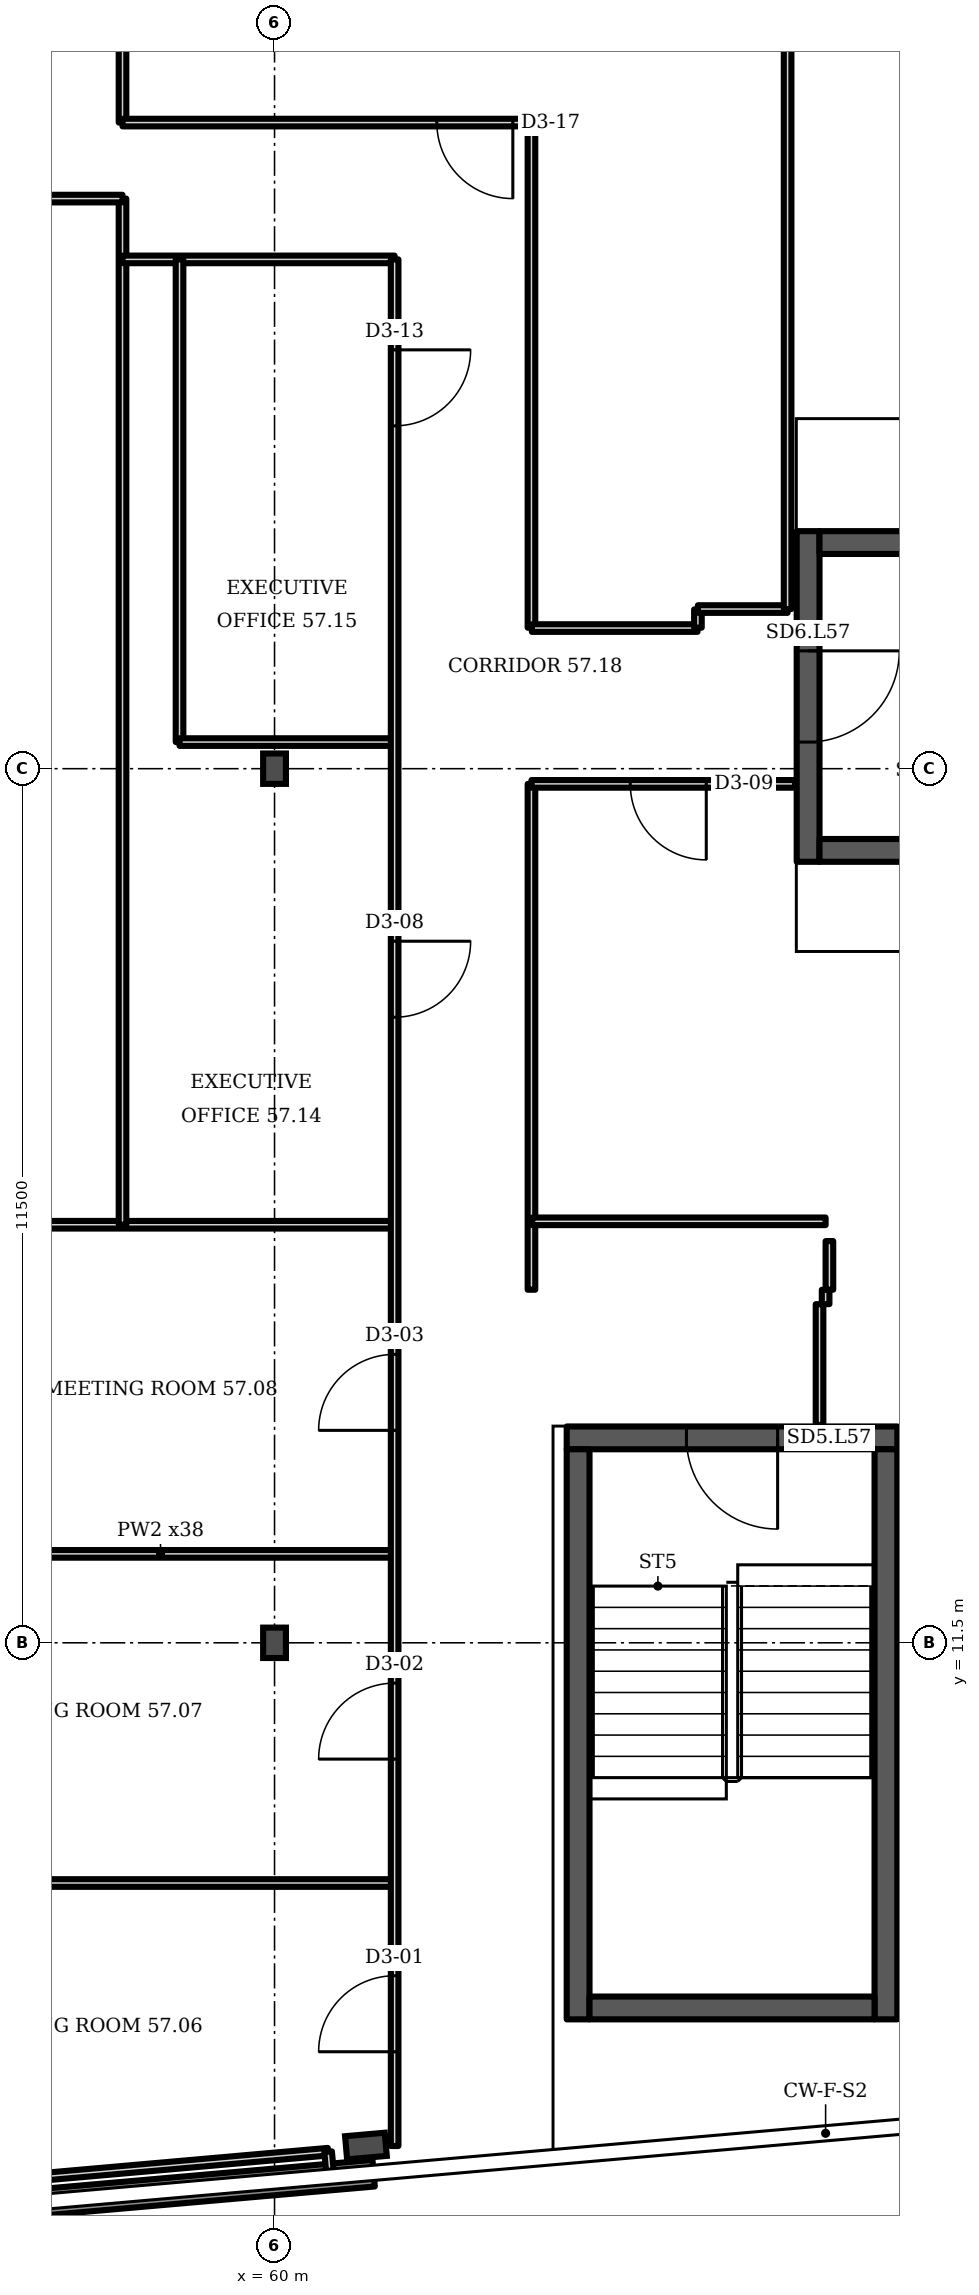
"""IFC4 building model, lengths in metres.
Left out: names, types, materials, properties, quantities, classifications, styles, units other than length and angle.
Written with IfcOpenShell. Run it as: python <this file> out.ifc"""

import sys

from ifc_helpers import new_model, si_unit, direction, frame, frame_2d, origin, origin_2d, place, context, subcontext, project, spatial, rectangle, i_section, extrude, element, fill, save


model = new_model("IFC4")
c1 = context("Model", 3, precision=1e-05, world=origin(), true_north=direction((0.0, 1.0)))
c2 = subcontext(c1, "Body", "Model", "MODEL_VIEW")
j1 = project(units=[si_unit("LENGTHUNIT", "METRE"), si_unit("PLANEANGLEUNIT", "RADIAN")], contexts=[c1])
p1 = place(None, origin())
s1 = spatial("IfcSite", under=j1, at=p1, CompositionType="ELEMENT")
p2 = place(p1, origin())
s2 = spatial("IfcBuilding", under=s1, at=p2, CompositionType="ELEMENT")
p3 = place(p2, frame((0.0, 0.0, 228.7)))
s3 = spatial("IfcBuildingStorey", under=s2, at=p3, CompositionType="ELEMENT", Elevation=228.7)
p4 = place(p3, frame((61.202, 4.879, 0.0), z_axis=(0.0, 0.0, 1.0), x_axis=(0.087156, -0.996197, 0.0)))
e1 = element("IfcColumn", 1, at=p4, inside=s3, PredefinedType="COLUMN", context=c2, shape_type="SweptSolid", body=[
    extrude(i_section(OverallWidth=0.306, OverallDepth=0.524, WebThickness=0.021, FlangeThickness=0.04, FilletRadius=0.027, at=origin_2d()), origin(), (0.0, 0.0, 1.0), 3.6),
])
for number, where, z_axis, x_axis in (
    (2, (60.0, 11.5, 0.0), (0.0, 0.0, 1.0), (1.0, 0.0, 0.0)),
    (3, (60.0, 23.0, 0.0), (0.0, 0.0, 1.0), (1.0, 0.0, 0.0)),
):
    element("IfcColumn", number, at=place(p3, frame(where, z_axis=z_axis, x_axis=x_axis)), inside=s3, PredefinedType="COLUMN", context=c2, shape_type="SweptSolid", body=[
        extrude(i_section(OverallWidth=0.3, OverallDepth=0.4, WebThickness=0.013, FlangeThickness=0.024, FilletRadius=0.027, at=origin_2d()), origin(), (0.0, 0.0, 1.0), 3.6),
    ])
p5 = place(p3, frame((49.545, 3.493, 0.0), z_axis=(0.0, 0.0, 1.0), x_axis=(0.996196, 0.087141, 0.0)))
e4 = element("IfcWall", 4, at=p5, inside=s3, PredefinedType="SOLIDWALL", context=c2, shape_type="SweptSolid", body=[
    extrude(rectangle(XDim=11.803, YDim=0.35, at=frame_2d((5.902, 0.0))), origin(), (0.0, 0.0, 1.0), 1.0),
])
p6 = place(p3, frame((63.844, 14.196, 0.0), z_axis=(0.0, 0.0, 1.0), x_axis=(1.0, 0.0, 0.0)))
e5 = element("IfcWall", 5, at=p6, inside=s3, PredefinedType="SHEAR", context=c2, shape_type="SweptSolid", body=[
    extrude(rectangle(XDim=4.35, YDim=0.3, at=frame_2d((2.175, 0.0))), origin(), (0.0, 0.0, 1.0), 3.2),
])
p7 = place(p6, frame((1.575, 0.0, 0.0)))
e6 = element("IfcOpeningElement", 6, at=p7, cuts=e5, PredefinedType="OPENING", context=c2, shape_type="SweptSolid", body=[
    extrude(rectangle(XDim=1.2, YDim=2.1, at=frame_2d((0.6, 1.05))), frame((0.0, 0.16, 0.0), z_axis=(0.0, -1.0, 0.0), x_axis=(1.0, 0.0, 0.0)), (0.0, 0.0, 1.0), 0.32),
])
p8 = place(p3, frame((67.02, 21.775, 0.0), z_axis=(0.0, 0.0, 1.0), x_axis=(0.0, 1.0, 0.0)))
e7 = element("IfcWall", 7, at=p8, inside=s3, PredefinedType="SHEAR", context=c2, shape_type="SweptSolid", body=[
    extrude(rectangle(XDim=4.35, YDim=0.3, at=frame_2d((2.175, 0.0))), origin(), (0.0, 0.0, 1.0), 3.2),
])
p9 = place(p8, frame((1.575, 0.0, 0.0)))
e8 = element("IfcOpeningElement", 8, at=p9, cuts=e7, PredefinedType="OPENING", context=c2, shape_type="SweptSolid", body=[
    extrude(rectangle(XDim=1.2, YDim=2.1, at=frame_2d((0.6, 1.05))), frame((0.0, 0.16, 0.0), z_axis=(0.0, -1.0, 0.0), x_axis=(1.0, 0.0, 0.0)), (0.0, 0.0, 1.0), 0.32),
])
p10 = place(p3, frame((39.04, 17.0, 0.0), z_axis=(0.0, 0.0, 1.0), x_axis=(1.0, 0.0, 0.0)))
e9 = element("IfcWall", 9, at=p10, inside=s3, PredefinedType="PARTITIONING", context=c2, shape_type="SweptSolid", body=[
    extrude(rectangle(XDim=22.54, YDim=0.1, at=frame_2d((11.27, 0.0))), origin(), (0.0, 0.0, 1.0), 3.2),
])
p11 = place(p3, frame((55.415, 4.34, 0.0), z_axis=(0.0, 0.0, 1.0), x_axis=(0.996159, 0.087534, 0.0)))
e10 = element("IfcWall", 10, at=p11, inside=s3, PredefinedType="PARTITIONING", context=c2, shape_type="SweptSolid", body=[
    extrude(rectangle(XDim=5.31, YDim=0.1, at=frame_2d((2.655, 0.0))), origin(), (0.0, 0.0, 1.0), 2.58),
])
for number, where, z_axis, x_axis in (
    (11, (55.42, 8.34, 0.0), (0.0, 0.0, 1.0), (1.0, 0.0, 0.0)),
    (12, (55.42, 12.67, 0.0), (0.0, 0.0, 1.0), (1.0, 0.0, 0.0)),
):
    element("IfcWall", number, at=place(p3, frame(where, z_axis=z_axis, x_axis=x_axis)), inside=s3, PredefinedType="PARTITIONING", context=c2, shape_type="SweptSolid", body=[
        extrude(rectangle(XDim=6.16, YDim=0.1, at=frame_2d((3.08, 0.0))), origin(), (0.0, 0.0, 1.0), 3.2),
    ])
p12 = place(p3, frame((58.0, 17.0, 0.0), z_axis=(0.0, 0.0, 1.0), x_axis=(0.0, 1.0, 0.0)))
e13 = element("IfcWall", 13, at=p12, inside=s3, PredefinedType="PARTITIONING", context=c2, shape_type="SweptSolid", body=[
    extrude(rectangle(XDim=13.5, YDim=0.1, at=frame_2d((6.75, 0.0))), origin(), (0.0, 0.0, 1.0), 3.2),
])
p13 = place(p3, frame((58.0, 29.7, 0.0), z_axis=(0.0, 0.0, 1.0), x_axis=(1.0, 0.0, 0.0)))
e14 = element("IfcWall", 14, at=p13, inside=s3, PredefinedType="PARTITIONING", context=c2, shape_type="SweptSolid", body=[
    extrude(rectangle(XDim=3.58, YDim=0.1, at=frame_2d((1.79, 0.0))), origin(), (0.0, 0.0, 1.0), 3.2),
])
p14 = place(p3, frame((58.0, 31.5, 0.0), z_axis=(0.0, 0.0, 1.0), x_axis=(0.0, 1.0, 0.0)))
e15 = element("IfcWall", 15, at=p14, inside=s3, PredefinedType="PARTITIONING", context=c2, shape_type="SweptSolid", body=[
    extrude(rectangle(XDim=2.48, YDim=0.1, at=frame_2d((1.24, 0.0))), origin(), (0.0, 0.0, 1.0), 3.2),
])
p15 = place(p3, frame((58.0, 31.5, 0.0), z_axis=(0.0, 0.0, 1.0), x_axis=(1.0, 0.0, 0.0)))
e16 = element("IfcWall", 16, at=p15, inside=s3, PredefinedType="PARTITIONING", context=c2, shape_type="SweptSolid", body=[
    extrude(rectangle(XDim=5.38, YDim=0.1, at=frame_2d((2.69, 0.0))), origin(), (0.0, 0.0, 1.0), 3.2),
])
p16 = place(p15, frame((4.135, 0.0, 0.0)))
e17 = element("IfcOpeningElement", 17, at=p16, cuts=e16, PredefinedType="OPENING", context=c2, shape_type="SweptSolid", body=[
    extrude(rectangle(XDim=1.0, YDim=2.1, at=frame_2d((0.5, 1.05))), frame((0.0, 0.06, 0.0), z_axis=(0.0, -1.0, 0.0), x_axis=(1.0, 0.0, 0.0)), (0.0, 0.0, 1.0), 0.12),
])
p17 = place(p3, frame((58.75, 23.35, 0.0), z_axis=(0.0, 0.0, 1.0), x_axis=(0.0, 1.0, 0.0)))
e18 = element("IfcWall", 18, at=p17, inside=s3, PredefinedType="PARTITIONING", context=c2, shape_type="SweptSolid", body=[
    extrude(rectangle(XDim=6.35, YDim=0.1, at=frame_2d((3.175, 0.0))), origin(), (0.0, 0.0, 1.0), 3.2),
])
p18 = place(p3, frame((58.75, 23.35, 0.0), z_axis=(0.0, 0.0, 1.0), x_axis=(1.0, 0.0, 0.0)))
e19 = element("IfcWall", 19, at=p18, inside=s3, PredefinedType="PARTITIONING", context=c2, shape_type="SweptSolid", body=[
    extrude(rectangle(XDim=2.83, YDim=0.1, at=frame_2d((1.415, 0.0))), origin(), (0.0, 0.0, 1.0), 3.2),
])
p19 = place(p3, frame((60.733, 4.497, 0.0), z_axis=(0.0, 0.0, 1.0), x_axis=(-0.090037, 0.995936, 0.0)))
e20 = element("IfcWall", 20, at=p19, inside=s3, PredefinedType="PARTITIONING", context=c2, shape_type="SweptSolid", body=[
    extrude(rectangle(XDim=0.309, YDim=0.1, at=frame_2d((0.155, 0.0))), origin(), (0.0, 0.0, 1.0), 3.2),
])
p20 = place(p3, frame((61.58, 4.88, 0.0), z_axis=(0.0, 0.0, 1.0), x_axis=(0.0, 1.0, 0.0)))
e21 = element("IfcWall", 21, at=p20, inside=s3, PredefinedType="PARTITIONING", context=c2, shape_type="SweptSolid", body=[
    extrude(rectangle(XDim=24.82, YDim=0.1, at=frame_2d((12.41, 0.0))), origin(), (0.0, 0.0, 1.0), 3.2),
])
p21 = place(p20, frame((1.24, 0.0, 0.0)))
e22 = element("IfcOpeningElement", 22, at=p21, cuts=e21, PredefinedType="OPENING", context=c2, shape_type="SweptSolid", body=[
    extrude(rectangle(XDim=1.0, YDim=2.1, at=frame_2d((0.5, 1.05))), frame((0.0, 0.06, 0.0), z_axis=(0.0, -1.0, 0.0), x_axis=(1.0, 0.0, 0.0)), (0.0, 0.0, 1.0), 0.12),
])
p22 = place(p20, frame((5.09, 0.0, 0.0)))
e23 = element("IfcOpeningElement", 23, at=p22, cuts=e21, PredefinedType="OPENING", context=c2, shape_type="SweptSolid", body=[
    extrude(rectangle(XDim=1.0, YDim=2.1, at=frame_2d((0.5, 1.05))), frame((0.0, 0.06, 0.0), z_axis=(0.0, -1.0, 0.0), x_axis=(1.0, 0.0, 0.0)), (0.0, 0.0, 1.0), 0.12),
])
p23 = place(p20, frame((9.415, 0.0, 0.0)))
e24 = element("IfcOpeningElement", 24, at=p23, cuts=e21, PredefinedType="OPENING", context=c2, shape_type="SweptSolid", body=[
    extrude(rectangle(XDim=1.0, YDim=2.1, at=frame_2d((0.5, 1.05))), frame((0.0, 0.06, 0.0), z_axis=(0.0, -1.0, 0.0), x_axis=(1.0, 0.0, 0.0)), (0.0, 0.0, 1.0), 0.12),
])
p24 = place(p20, frame((14.85, 0.0, 0.0)))
e25 = element("IfcOpeningElement", 25, at=p24, cuts=e21, PredefinedType="OPENING", context=c2, shape_type="SweptSolid", body=[
    extrude(rectangle(XDim=1.0, YDim=2.1, at=frame_2d((0.5, 1.05))), frame((0.0, 0.06, 0.0), z_axis=(0.0, -1.0, 0.0), x_axis=(1.0, 0.0, 0.0)), (0.0, 0.0, 1.0), 0.12),
])
p25 = place(p20, frame((22.63, 0.0, 0.0)))
e26 = element("IfcOpeningElement", 26, at=p25, cuts=e21, PredefinedType="OPENING", context=c2, shape_type="SweptSolid", body=[
    extrude(rectangle(XDim=1.0, YDim=2.1, at=frame_2d((0.5, 1.05))), frame((0.0, 0.06, 0.0), z_axis=(0.0, -1.0, 0.0), x_axis=(1.0, 0.0, 0.0)), (0.0, 0.0, 1.0), 0.12),
])
p26 = place(p3, frame((63.38, 16.145, 0.0), z_axis=(0.0, 0.0, 1.0), x_axis=(0.0, 1.0, 0.0)))
e27 = element("IfcWall", 27, at=p26, inside=s3, PredefinedType="PARTITIONING", context=c2, shape_type="SweptSolid", body=[
    extrude(rectangle(XDim=6.655, YDim=0.1, at=frame_2d((3.328, 0.0))), origin(), (0.0, 0.0, 1.0), 3.2),
])
p27 = place(p3, frame((63.38, 22.8, 0.0), z_axis=(0.0, 0.0, 1.0), x_axis=(1.0, 0.0, 0.0)))
e28 = element("IfcWall", 28, at=p27, inside=s3, PredefinedType="PARTITIONING", context=c2, shape_type="SweptSolid", body=[
    extrude(rectangle(XDim=3.47, YDim=0.1, at=frame_2d((1.735, 0.0))), origin(), (0.0, 0.0, 1.0), 3.2),
])
p28 = place(p27, frame((1.3, 0.0, 0.0)))
e29 = element("IfcOpeningElement", 29, at=p28, cuts=e28, PredefinedType="OPENING", context=c2, shape_type="SweptSolid", body=[
    extrude(rectangle(XDim=1.0, YDim=2.1, at=frame_2d((0.5, 1.05))), frame((0.0, 0.06, 0.0), z_axis=(0.0, -1.0, 0.0), x_axis=(1.0, 0.0, 0.0)), (0.0, 0.0, 1.0), 0.12),
])
p29 = place(p3, frame((63.38, 24.855, 0.0), z_axis=(0.0, 0.0, 1.0), x_axis=(0.0, 1.0, 0.0)))
e30 = element("IfcWall", 30, at=p29, inside=s3, PredefinedType="PARTITIONING", context=c2, shape_type="SweptSolid", body=[
    extrude(rectangle(XDim=6.645, YDim=0.1, at=frame_2d((3.323, 0.0))), origin(), (0.0, 0.0, 1.0), 3.2),
])
p30 = place(p3, frame((63.385, 24.85, 0.0), z_axis=(0.0, 0.0, 1.0), x_axis=(1.0, 0.0, 0.0)))
e31 = element("IfcWall", 31, at=p30, inside=s3, PredefinedType="PARTITIONING", context=c2, shape_type="SweptSolid", body=[
    extrude(rectangle(XDim=2.18, YDim=0.1, at=frame_2d((1.09, 0.0))), origin(), (0.0, 0.0, 1.0), 3.2),
])
p31 = place(p3, frame((63.39, 17.045, 0.0), z_axis=(0.0, 0.0, 1.0), x_axis=(1.0, 0.0, 0.0)))
e32 = element("IfcWall", 32, at=p31, inside=s3, PredefinedType="PARTITIONING", context=c2, shape_type="SweptSolid", body=[
    extrude(rectangle(XDim=3.86, YDim=0.1, at=frame_2d((1.93, 0.0))), origin(), (0.0, 0.0, 1.0), 3.2),
])
p32 = place(p3, frame((65.57, 24.855, 0.0), z_axis=(0.0, 0.0, 1.0), x_axis=(0.0, 1.0, 0.0)))
e33 = element("IfcWall", 33, at=p32, inside=s3, PredefinedType="PARTITIONING", context=c2, shape_type="SweptSolid", body=[
    extrude(rectangle(XDim=0.24, YDim=0.1, at=frame_2d((0.12, 0.0))), origin(), (0.0, 0.0, 1.0), 3.2),
])
p33 = place(p3, frame((65.57, 25.1, 0.0), z_axis=(0.0, 0.0, 1.0), x_axis=(1.0, 0.0, 0.0)))
e34 = element("IfcWall", 34, at=p33, inside=s3, PredefinedType="PARTITIONING", context=c2, shape_type="SweptSolid", body=[
    extrude(rectangle(XDim=1.18, YDim=0.1, at=frame_2d((0.59, 0.0))), origin(), (0.0, 0.0, 1.0), 3.2),
])
p34 = place(p3, frame((66.75, 25.1, 0.0), z_axis=(0.0, 0.0, 1.0), x_axis=(0.0, 1.0, 0.0)))
e35 = element("IfcWall", 35, at=p34, inside=s3, PredefinedType="PARTITIONING", context=c2, shape_type="SweptSolid", body=[
    extrude(rectangle(XDim=16.88, YDim=0.1, at=frame_2d((8.44, 0.0))), origin(), (0.0, 0.0, 1.0), 3.2),
])
p35 = place(p3, frame((67.17, 14.366, 0.0), z_axis=(0.0, 0.0, 1.0), x_axis=(0.0, 1.0, 0.0)))
e36 = element("IfcWall", 36, at=p35, inside=s3, PredefinedType="PARTITIONING", context=c2, shape_type="SweptSolid", body=[
    extrude(rectangle(XDim=1.589, YDim=0.1, at=frame_2d((0.794, 0.0))), origin(), (0.0, 0.0, 1.0), 3.2),
])
p36 = place(p3, frame((67.25, 15.955, 0.0), z_axis=(0.0, 0.0, 1.0), x_axis=(0.0, 1.0, 0.0)))
e37 = element("IfcWall", 37, at=p36, inside=s3, PredefinedType="PARTITIONING", context=c2, shape_type="SweptSolid", body=[
    extrude(rectangle(XDim=0.19, YDim=0.1, at=frame_2d((0.095, 0.0))), origin(), (0.0, 0.0, 1.0), 3.2),
])
p37 = place(p3, frame((67.3, 16.145, 0.0), z_axis=(0.0, 0.0, 1.0), x_axis=(0.0, 1.0, 0.0)))
e38 = element("IfcWall", 38, at=p37, inside=s3, PredefinedType="PARTITIONING", context=c2, shape_type="SweptSolid", body=[
    extrude(rectangle(XDim=0.64, YDim=0.1, at=frame_2d((0.32, 0.0))), origin(), (0.0, 0.0, 1.0), 3.2),
])
p38 = place(p3, frame((44.15, 30.5, 0.0), z_axis=(0.0, 0.0, 1.0), x_axis=(1.0, 0.0, 0.0)))
e39 = element("IfcWall", 39, at=p38, inside=s3, PredefinedType="PARTITIONING", context=c2, shape_type="SweptSolid", body=[
    extrude(rectangle(XDim=13.85, YDim=0.1, at=frame_2d((6.925, 0.0))), origin(), (0.0, 0.0, 1.0), 3.2),
])
p39 = place(p38, frame((6.77, 0.0, 0.0)))
e40 = element("IfcOpeningElement", 40, at=p39, cuts=e39, PredefinedType="OPENING", context=c2, shape_type="SweptSolid", body=[
    extrude(rectangle(XDim=1.0, YDim=2.1, at=frame_2d((0.5, 1.05))), frame((0.0, 0.06, 0.0), z_axis=(0.0, -1.0, 0.0), x_axis=(1.0, 0.0, 0.0)), (0.0, 0.0, 1.0), 0.12),
])
for number, where, z_axis, x_axis in (
    (41, (63.994, 6.546, 0.0), (0.0, 0.0, 1.0), (0.0, 1.0, 0.0)),
    (42, (68.044, 6.546, 0.0), (0.0, 0.0, 1.0), (0.0, 1.0, 0.0)),
):
    element("IfcWall", number, at=place(p3, frame(where, z_axis=z_axis, x_axis=x_axis)), inside=s3, PredefinedType="SHEAR", context=c2, shape_type="SweptSolid", body=[
        extrude(rectangle(XDim=7.5, YDim=0.3, at=frame_2d((3.75, 0.0))), origin(), (0.0, 0.0, 1.0), 3.2),
    ])
p40 = place(p3, frame((64.144, 6.696, 0.0), z_axis=(0.0, 0.0, 1.0), x_axis=(1.0, 0.0, 0.0)))
e43 = element("IfcWall", 43, at=p40, inside=s3, PredefinedType="SHEAR", context=c2, shape_type="SweptSolid", body=[
    extrude(rectangle(XDim=3.75, YDim=0.3, at=frame_2d((1.875, 0.0))), origin(), (0.0, 0.0, 1.0), 3.2),
])
for number, where, z_axis, x_axis in (
    (44, (67.17, 21.925, 0.0), (0.0, 0.0, 1.0), (1.0, 0.0, 0.0)),
    (45, (67.17, 25.975, 0.0), (0.0, 0.0, 1.0), (1.0, 0.0, 0.0)),
):
    element("IfcWall", number, at=place(p3, frame(where, z_axis=z_axis, x_axis=x_axis)), inside=s3, PredefinedType="SHEAR", context=c2, shape_type="SweptSolid", body=[
        extrude(rectangle(XDim=7.5, YDim=0.3, at=frame_2d((3.75, 0.0))), origin(), (0.0, 0.0, 1.0), 3.2),
    ])
p41 = place(p7, origin())
e46 = element("IfcDoor", 46, at=p41, inside=s3, OperationType="SINGLE_SWING_RIGHT", PredefinedType="DOOR", context=c2, shape_type="SweptSolid", body=[
    extrude(rectangle(XDim=1.2, YDim=2.1, at=frame_2d((0.6, 1.05))), frame((0.0, 0.025, 0.0), z_axis=(0.0, -1.0, 0.0), x_axis=(1.0, 0.0, 0.0)), (0.0, 0.0, 1.0), 0.05),
])
fill(e6, e46)
p42 = place(p9, origin())
e47 = element("IfcDoor", 47, at=p42, inside=s3, OperationType="SINGLE_SWING_RIGHT", PredefinedType="DOOR", context=c2, shape_type="SweptSolid", body=[
    extrude(rectangle(XDim=1.2, YDim=2.1, at=frame_2d((0.6, 1.05))), frame((0.0, 0.025, 0.0), z_axis=(0.0, -1.0, 0.0), x_axis=(1.0, 0.0, 0.0)), (0.0, 0.0, 1.0), 0.05),
])
fill(e8, e47)
p43 = place(p21, origin())
e48 = element("IfcDoor", 48, at=p43, inside=s3, OperationType="SINGLE_SWING_LEFT", PredefinedType="DOOR", context=c2, shape_type="SweptSolid", body=[
    extrude(rectangle(XDim=1.0, YDim=2.1, at=frame_2d((0.5, 1.05))), frame((0.0, 0.025, 0.0), z_axis=(0.0, -1.0, 0.0), x_axis=(1.0, 0.0, 0.0)), (0.0, 0.0, 1.0), 0.05),
])
fill(e22, e48)
p44 = place(p22, origin())
e49 = element("IfcDoor", 49, at=p44, inside=s3, OperationType="SINGLE_SWING_LEFT", PredefinedType="DOOR", context=c2, shape_type="SweptSolid", body=[
    extrude(rectangle(XDim=1.0, YDim=2.1, at=frame_2d((0.5, 1.05))), frame((0.0, 0.025, 0.0), z_axis=(0.0, -1.0, 0.0), x_axis=(1.0, 0.0, 0.0)), (0.0, 0.0, 1.0), 0.05),
])
fill(e23, e49)
p45 = place(p23, origin())
e50 = element("IfcDoor", 50, at=p45, inside=s3, OperationType="SINGLE_SWING_LEFT", PredefinedType="DOOR", context=c2, shape_type="SweptSolid", body=[
    extrude(rectangle(XDim=1.0, YDim=2.1, at=frame_2d((0.5, 1.05))), frame((0.0, 0.025, 0.0), z_axis=(0.0, -1.0, 0.0), x_axis=(1.0, 0.0, 0.0)), (0.0, 0.0, 1.0), 0.05),
])
fill(e24, e50)
p46 = place(p24, origin())
e51 = element("IfcDoor", 51, at=p46, inside=s3, OperationType="SINGLE_SWING_RIGHT", PredefinedType="DOOR", context=c2, shape_type="SweptSolid", body=[
    extrude(rectangle(XDim=1.0, YDim=2.1, at=frame_2d((0.5, 1.05))), frame((0.0, 0.025, 0.0), z_axis=(0.0, -1.0, 0.0), x_axis=(1.0, 0.0, 0.0)), (0.0, 0.0, 1.0), 0.05),
])
fill(e25, e51)
p47 = place(p28, origin())
e52 = element("IfcDoor", 52, at=p47, inside=s3, OperationType="SINGLE_SWING_RIGHT", PredefinedType="DOOR", context=c2, shape_type="SweptSolid", body=[
    extrude(rectangle(XDim=1.0, YDim=2.1, at=frame_2d((0.5, 1.05))), frame((0.0, 0.025, 0.0), z_axis=(0.0, -1.0, 0.0), x_axis=(1.0, 0.0, 0.0)), (0.0, 0.0, 1.0), 0.05),
])
fill(e29, e52)
p48 = place(p25, origin())
e53 = element("IfcDoor", 53, at=p48, inside=s3, OperationType="SINGLE_SWING_RIGHT", PredefinedType="DOOR", context=c2, shape_type="SweptSolid", body=[
    extrude(rectangle(XDim=1.0, YDim=2.1, at=frame_2d((0.5, 1.05))), frame((0.0, 0.025, 0.0), z_axis=(0.0, -1.0, 0.0), x_axis=(1.0, 0.0, 0.0)), (0.0, 0.0, 1.0), 0.05),
])
fill(e26, e53)
p49 = place(p16, origin())
e54 = element("IfcDoor", 54, at=p49, inside=s3, OperationType="SINGLE_SWING_RIGHT", PredefinedType="DOOR", context=c2, shape_type="SweptSolid", body=[
    extrude(rectangle(XDim=1.0, YDim=2.1, at=frame_2d((0.5, 1.05))), frame((0.0, 0.025, 0.0), z_axis=(0.0, -1.0, 0.0), x_axis=(1.0, 0.0, 0.0)), (0.0, 0.0, 1.0), 0.05),
])
fill(e17, e54)
save(model, sys.argv[1])
